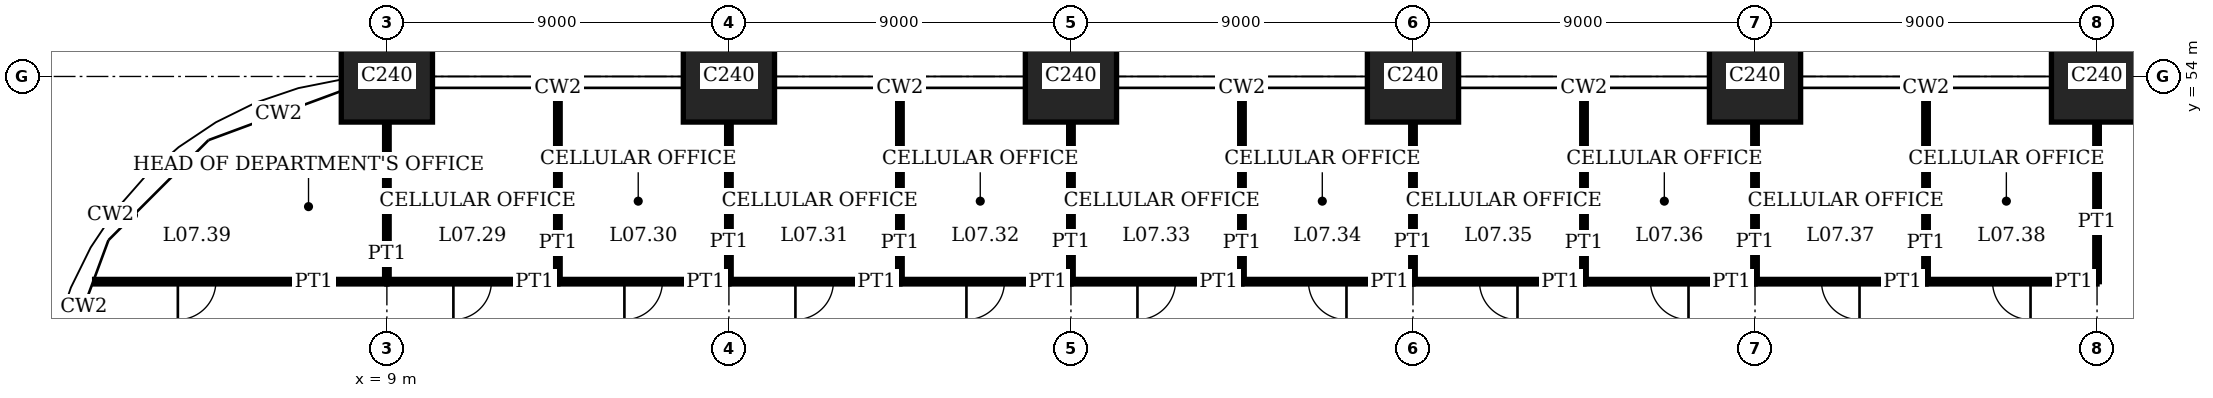
"""IFC4 building model, lengths in metres.
Left out: names, types, materials, properties, quantities, classifications, styles, units other than length and angle.
Written with IfcOpenShell. Run it as: python <this file> out.ifc"""

import sys

from ifc_helpers import new_model, si_unit, direction, frame, frame_2d, origin, origin_2d, place, context, subcontext, project, spatial, rectangle, extrude, element, fill, save


model = new_model("IFC4")
c1 = context("Model", 3, precision=1e-05, world=origin(), true_north=direction((0.0, 1.0)))
c2 = subcontext(c1, "Body", "Model", "MODEL_VIEW")
j1 = project(units=[si_unit("LENGTHUNIT", "METRE"), si_unit("PLANEANGLEUNIT", "RADIAN")], contexts=[c1])
p1 = place(None, origin())
s1 = spatial("IfcSite", under=j1, at=p1, CompositionType="ELEMENT")
p2 = place(p1, origin())
s2 = spatial("IfcBuilding", under=s1, at=p2, CompositionType="ELEMENT")
p3 = place(p2, frame((0.0, 0.0, 31.8)))
s3 = spatial("IfcBuildingStorey", under=s2, at=p3, CompositionType="ELEMENT", Elevation=31.8)
for number, where, z_axis, x_axis in (
    (1, (9.0, 54.0, 0.0), (0.0, 0.0, 1.0), (1.0, 0.0, 0.0)),
    (2, (18.0, 54.0, 0.0), (0.0, 0.0, 1.0), (1.0, 0.0, 0.0)),
    (3, (27.0, 54.0, 0.0), (0.0, 0.0, 1.0), (1.0, 0.0, 0.0)),
    (4, (36.0, 54.0, 0.0), (0.0, 0.0, 1.0), (1.0, 0.0, 0.0)),
    (5, (45.0, 54.0, 0.0), (0.0, 0.0, 1.0), (1.0, 0.0, 0.0)),
    (6, (54.0, 54.0, 0.0), (0.0, 0.0, 1.0), (1.0, 0.0, 0.0)),
):
    element("IfcColumn", number, at=place(p3, frame(where, z_axis=z_axis, x_axis=x_axis)), inside=s3, PredefinedType="COLUMN", context=c2, shape_type="SweptSolid", body=[
        extrude(rectangle(XDim=2.4, YDim=2.4, at=origin_2d()), origin(), (0.0, 0.0, 1.0), 4.0),
    ])
p4 = place(p3, frame((9.0, 48.6, 0.0), z_axis=(0.0, 0.0, 1.0), x_axis=(1.0, 0.0, 0.0)))
e7 = element("IfcWall", 7, at=p4, inside=s3, PredefinedType="PARTITIONING", context=c2, shape_type="SweptSolid", body=[
    extrude(rectangle(XDim=4.5, YDim=0.12, at=frame_2d((2.25, 0.0))), origin(), (0.0, 0.0, 1.0), 3.75),
])
p5 = place(p4, frame((1.75, 0.0, 0.0)))
e8 = element("IfcOpeningElement", 8, at=p5, cuts=e7, PredefinedType="OPENING", context=c2, shape_type="SweptSolid", body=[
    extrude(rectangle(XDim=1.0, YDim=2.4, at=frame_2d((0.5, 1.2))), frame((0.0, 0.07, 0.0), z_axis=(0.0, -1.0, 0.0), x_axis=(1.0, 0.0, 0.0)), (0.0, 0.0, 1.0), 0.14),
])
p6 = place(p3, frame((13.5, 48.6, 0.0), z_axis=(0.0, 0.0, 1.0), x_axis=(1.0, 0.0, 0.0)))
e9 = element("IfcWall", 9, at=p6, inside=s3, PredefinedType="PARTITIONING", context=c2, shape_type="SweptSolid", body=[
    extrude(rectangle(XDim=4.5, YDim=0.12, at=frame_2d((2.25, 0.0))), origin(), (0.0, 0.0, 1.0), 3.75),
])
p7 = place(p6, frame((1.75, 0.0, 0.0)))
e10 = element("IfcOpeningElement", 10, at=p7, cuts=e9, PredefinedType="OPENING", context=c2, shape_type="SweptSolid", body=[
    extrude(rectangle(XDim=1.0, YDim=2.4, at=frame_2d((0.5, 1.2))), frame((0.0, 0.07, 0.0), z_axis=(0.0, -1.0, 0.0), x_axis=(1.0, 0.0, 0.0)), (0.0, 0.0, 1.0), 0.14),
])
p8 = place(p3, frame((18.0, 48.6, 0.0), z_axis=(0.0, 0.0, 1.0), x_axis=(1.0, 0.0, 0.0)))
e11 = element("IfcWall", 11, at=p8, inside=s3, PredefinedType="PARTITIONING", context=c2, shape_type="SweptSolid", body=[
    extrude(rectangle(XDim=4.5, YDim=0.12, at=frame_2d((2.25, 0.0))), origin(), (0.0, 0.0, 1.0), 3.75),
])
p9 = place(p8, frame((1.75, 0.0, 0.0)))
e12 = element("IfcOpeningElement", 12, at=p9, cuts=e11, PredefinedType="OPENING", context=c2, shape_type="SweptSolid", body=[
    extrude(rectangle(XDim=1.0, YDim=2.4, at=frame_2d((0.5, 1.2))), frame((0.0, 0.07, 0.0), z_axis=(0.0, -1.0, 0.0), x_axis=(1.0, 0.0, 0.0)), (0.0, 0.0, 1.0), 0.14),
])
p10 = place(p3, frame((22.5, 48.6, 0.0), z_axis=(0.0, 0.0, 1.0), x_axis=(1.0, 0.0, 0.0)))
e13 = element("IfcWall", 13, at=p10, inside=s3, PredefinedType="PARTITIONING", context=c2, shape_type="SweptSolid", body=[
    extrude(rectangle(XDim=4.5, YDim=0.12, at=frame_2d((2.25, 0.0))), origin(), (0.0, 0.0, 1.0), 3.75),
])
p11 = place(p10, frame((1.75, 0.0, 0.0)))
e14 = element("IfcOpeningElement", 14, at=p11, cuts=e13, PredefinedType="OPENING", context=c2, shape_type="SweptSolid", body=[
    extrude(rectangle(XDim=1.0, YDim=2.4, at=frame_2d((0.5, 1.2))), frame((0.0, 0.07, 0.0), z_axis=(0.0, -1.0, 0.0), x_axis=(1.0, 0.0, 0.0)), (0.0, 0.0, 1.0), 0.14),
])
p12 = place(p3, frame((27.0, 48.6, 0.0), z_axis=(0.0, 0.0, 1.0), x_axis=(1.0, 0.0, 0.0)))
e15 = element("IfcWall", 15, at=p12, inside=s3, PredefinedType="PARTITIONING", context=c2, shape_type="SweptSolid", body=[
    extrude(rectangle(XDim=4.5, YDim=0.12, at=frame_2d((2.25, 0.0))), origin(), (0.0, 0.0, 1.0), 3.75),
])
p13 = place(p12, frame((1.75, 0.0, 0.0)))
e16 = element("IfcOpeningElement", 16, at=p13, cuts=e15, PredefinedType="OPENING", context=c2, shape_type="SweptSolid", body=[
    extrude(rectangle(XDim=1.0, YDim=2.4, at=frame_2d((0.5, 1.2))), frame((0.0, 0.07, 0.0), z_axis=(0.0, -1.0, 0.0), x_axis=(1.0, 0.0, 0.0)), (0.0, 0.0, 1.0), 0.14),
])
p14 = place(p3, frame((31.5, 48.6, 0.0), z_axis=(0.0, 0.0, 1.0), x_axis=(1.0, 0.0, 0.0)))
e17 = element("IfcWall", 17, at=p14, inside=s3, PredefinedType="PARTITIONING", context=c2, shape_type="SweptSolid", body=[
    extrude(rectangle(XDim=4.5, YDim=0.12, at=frame_2d((2.25, 0.0))), origin(), (0.0, 0.0, 1.0), 3.75),
])
p15 = place(p14, frame((1.75, 0.0, 0.0)))
e18 = element("IfcOpeningElement", 18, at=p15, cuts=e17, PredefinedType="OPENING", context=c2, shape_type="SweptSolid", body=[
    extrude(rectangle(XDim=1.0, YDim=2.4, at=frame_2d((0.5, 1.2))), frame((0.0, 0.07, 0.0), z_axis=(0.0, -1.0, 0.0), x_axis=(1.0, 0.0, 0.0)), (0.0, 0.0, 1.0), 0.14),
])
p16 = place(p3, frame((36.0, 48.6, 0.0), z_axis=(0.0, 0.0, 1.0), x_axis=(1.0, 0.0, 0.0)))
e19 = element("IfcWall", 19, at=p16, inside=s3, PredefinedType="PARTITIONING", context=c2, shape_type="SweptSolid", body=[
    extrude(rectangle(XDim=4.5, YDim=0.12, at=frame_2d((2.25, 0.0))), origin(), (0.0, 0.0, 1.0), 3.75),
])
p17 = place(p16, frame((1.75, 0.0, 0.0)))
e20 = element("IfcOpeningElement", 20, at=p17, cuts=e19, PredefinedType="OPENING", context=c2, shape_type="SweptSolid", body=[
    extrude(rectangle(XDim=1.0, YDim=2.4, at=frame_2d((0.5, 1.2))), frame((0.0, 0.07, 0.0), z_axis=(0.0, -1.0, 0.0), x_axis=(1.0, 0.0, 0.0)), (0.0, 0.0, 1.0), 0.14),
])
p18 = place(p3, frame((40.5, 48.6, 0.0), z_axis=(0.0, 0.0, 1.0), x_axis=(1.0, 0.0, 0.0)))
e21 = element("IfcWall", 21, at=p18, inside=s3, PredefinedType="PARTITIONING", context=c2, shape_type="SweptSolid", body=[
    extrude(rectangle(XDim=4.5, YDim=0.12, at=frame_2d((2.25, 0.0))), origin(), (0.0, 0.0, 1.0), 3.75),
])
p19 = place(p18, frame((1.75, 0.0, 0.0)))
e22 = element("IfcOpeningElement", 22, at=p19, cuts=e21, PredefinedType="OPENING", context=c2, shape_type="SweptSolid", body=[
    extrude(rectangle(XDim=1.0, YDim=2.4, at=frame_2d((0.5, 1.2))), frame((0.0, 0.07, 0.0), z_axis=(0.0, -1.0, 0.0), x_axis=(1.0, 0.0, 0.0)), (0.0, 0.0, 1.0), 0.14),
])
p20 = place(p3, frame((45.0, 48.6, 0.0), z_axis=(0.0, 0.0, 1.0), x_axis=(1.0, 0.0, 0.0)))
e23 = element("IfcWall", 23, at=p20, inside=s3, PredefinedType="PARTITIONING", context=c2, shape_type="SweptSolid", body=[
    extrude(rectangle(XDim=4.5, YDim=0.12, at=frame_2d((2.25, 0.0))), origin(), (0.0, 0.0, 1.0), 3.75),
])
p21 = place(p20, frame((1.75, 0.0, 0.0)))
e24 = element("IfcOpeningElement", 24, at=p21, cuts=e23, PredefinedType="OPENING", context=c2, shape_type="SweptSolid", body=[
    extrude(rectangle(XDim=1.0, YDim=2.4, at=frame_2d((0.5, 1.2))), frame((0.0, 0.07, 0.0), z_axis=(0.0, -1.0, 0.0), x_axis=(1.0, 0.0, 0.0)), (0.0, 0.0, 1.0), 0.14),
])
p22 = place(p3, frame((49.5, 48.6, 0.0), z_axis=(0.0, 0.0, 1.0), x_axis=(1.0, 0.0, 0.0)))
e25 = element("IfcWall", 25, at=p22, inside=s3, PredefinedType="PARTITIONING", context=c2, shape_type="SweptSolid", body=[
    extrude(rectangle(XDim=4.5, YDim=0.12, at=frame_2d((2.25, 0.0))), origin(), (0.0, 0.0, 1.0), 3.75),
])
p23 = place(p22, frame((1.75, 0.0, 0.0)))
e26 = element("IfcOpeningElement", 26, at=p23, cuts=e25, PredefinedType="OPENING", context=c2, shape_type="SweptSolid", body=[
    extrude(rectangle(XDim=1.0, YDim=2.4, at=frame_2d((0.5, 1.2))), frame((0.0, 0.07, 0.0), z_axis=(0.0, -1.0, 0.0), x_axis=(1.0, 0.0, 0.0)), (0.0, 0.0, 1.0), 0.14),
])
p24 = place(p3, frame((1.31, 48.6, 0.0), z_axis=(0.0, 0.0, 1.0), x_axis=(1.0, 0.0, 0.0)))
e27 = element("IfcWall", 27, at=p24, inside=s3, PredefinedType="PARTITIONING", context=c2, shape_type="SweptSolid", body=[
    extrude(rectangle(XDim=7.69, YDim=0.12, at=frame_2d((3.845, 0.0))), origin(), (0.0, 0.0, 1.0), 3.75),
])
p25 = place(p24, frame((2.19, 0.0, 0.0)))
e28 = element("IfcOpeningElement", 28, at=p25, cuts=e27, PredefinedType="OPENING", context=c2, shape_type="SweptSolid", body=[
    extrude(rectangle(XDim=1.0, YDim=2.4, at=frame_2d((0.5, 1.2))), frame((0.0, 0.07, 0.0), z_axis=(0.0, -1.0, 0.0), x_axis=(1.0, 0.0, 0.0)), (0.0, 0.0, 1.0), 0.14),
])
p26 = place(p3, frame((9.0, 48.6, 0.0), z_axis=(0.0, 0.0, 1.0), x_axis=(0.0, 1.0, 0.0)))
e29 = element("IfcWall", 29, at=p26, inside=s3, PredefinedType="PARTITIONING", context=c2, shape_type="SweptSolid", body=[
    extrude(rectangle(XDim=4.2, YDim=0.12, at=frame_2d((2.1, 0.0))), origin(), (0.0, 0.0, 1.0), 3.05),
])
p27 = place(p3, frame((13.5, 48.6, 0.0), z_axis=(0.0, 0.0, 1.0), x_axis=(0.0, 1.0, 0.0)))
e30 = element("IfcWall", 30, at=p27, inside=s3, PredefinedType="PARTITIONING", context=c2, shape_type="SweptSolid", body=[
    extrude(rectangle(XDim=5.09, YDim=0.12, at=frame_2d((2.545, 0.0))), origin(), (0.0, 0.0, 1.0), 3.75),
])
p28 = place(p3, frame((18.0, 48.6, 0.0), z_axis=(0.0, 0.0, 1.0), x_axis=(0.0, 1.0, 0.0)))
e31 = element("IfcWall", 31, at=p28, inside=s3, PredefinedType="PARTITIONING", context=c2, shape_type="SweptSolid", body=[
    extrude(rectangle(XDim=4.2, YDim=0.12, at=frame_2d((2.1, 0.0))), origin(), (0.0, 0.0, 1.0), 3.05),
])
p29 = place(p3, frame((22.5, 48.6, 0.0), z_axis=(0.0, 0.0, 1.0), x_axis=(0.0, 1.0, 0.0)))
e32 = element("IfcWall", 32, at=p29, inside=s3, PredefinedType="PARTITIONING", context=c2, shape_type="SweptSolid", body=[
    extrude(rectangle(XDim=5.09, YDim=0.12, at=frame_2d((2.545, 0.0))), origin(), (0.0, 0.0, 1.0), 3.75),
])
p30 = place(p3, frame((27.0, 48.6, 0.0), z_axis=(0.0, 0.0, 1.0), x_axis=(0.0, 1.0, 0.0)))
e33 = element("IfcWall", 33, at=p30, inside=s3, PredefinedType="PARTITIONING", context=c2, shape_type="SweptSolid", body=[
    extrude(rectangle(XDim=4.2, YDim=0.12, at=frame_2d((2.1, 0.0))), origin(), (0.0, 0.0, 1.0), 3.05),
])
p31 = place(p3, frame((31.5, 48.6, 0.0), z_axis=(0.0, 0.0, 1.0), x_axis=(0.0, 1.0, 0.0)))
e34 = element("IfcWall", 34, at=p31, inside=s3, PredefinedType="PARTITIONING", context=c2, shape_type="SweptSolid", body=[
    extrude(rectangle(XDim=5.09, YDim=0.12, at=frame_2d((2.545, 0.0))), origin(), (0.0, 0.0, 1.0), 3.75),
])
p32 = place(p3, frame((36.0, 48.6, 0.0), z_axis=(0.0, 0.0, 1.0), x_axis=(0.0, 1.0, 0.0)))
e35 = element("IfcWall", 35, at=p32, inside=s3, PredefinedType="PARTITIONING", context=c2, shape_type="SweptSolid", body=[
    extrude(rectangle(XDim=4.2, YDim=0.12, at=frame_2d((2.1, 0.0))), origin(), (0.0, 0.0, 1.0), 3.05),
])
p33 = place(p3, frame((40.5, 48.6, 0.0), z_axis=(0.0, 0.0, 1.0), x_axis=(0.0, 1.0, 0.0)))
e36 = element("IfcWall", 36, at=p33, inside=s3, PredefinedType="PARTITIONING", context=c2, shape_type="SweptSolid", body=[
    extrude(rectangle(XDim=5.09, YDim=0.12, at=frame_2d((2.545, 0.0))), origin(), (0.0, 0.0, 1.0), 3.75),
])
p34 = place(p3, frame((45.0, 48.6, 0.0), z_axis=(0.0, 0.0, 1.0), x_axis=(0.0, 1.0, 0.0)))
e37 = element("IfcWall", 37, at=p34, inside=s3, PredefinedType="PARTITIONING", context=c2, shape_type="SweptSolid", body=[
    extrude(rectangle(XDim=4.2, YDim=0.12, at=frame_2d((2.1, 0.0))), origin(), (0.0, 0.0, 1.0), 3.05),
])
p35 = place(p3, frame((49.5, 48.6, 0.0), z_axis=(0.0, 0.0, 1.0), x_axis=(0.0, 1.0, 0.0)))
e38 = element("IfcWall", 38, at=p35, inside=s3, PredefinedType="PARTITIONING", context=c2, shape_type="SweptSolid", body=[
    extrude(rectangle(XDim=5.09, YDim=0.12, at=frame_2d((2.545, 0.0))), origin(), (0.0, 0.0, 1.0), 3.75),
])
p36 = place(p3, frame((54.0, 48.6, 0.0), z_axis=(0.0, 0.0, 1.0), x_axis=(0.0, 1.0, 0.0)))
e39 = element("IfcWall", 39, at=p36, inside=s3, PredefinedType="PARTITIONING", context=c2, shape_type="SweptSolid", body=[
    extrude(rectangle(XDim=4.2, YDim=0.12, at=frame_2d((2.1, 0.0))), origin(), (0.0, 0.0, 1.0), 3.05),
])
p37 = place(p5, origin())
e40 = element("IfcDoor", 40, at=p37, inside=s3, OperationType="SINGLE_SWING_LEFT", PredefinedType="DOOR", context=c2, shape_type="SweptSolid", body=[
    extrude(rectangle(XDim=1.0, YDim=2.4, at=frame_2d((0.5, 1.2))), frame((0.0, 0.025, 0.0), z_axis=(0.0, -1.0, 0.0), x_axis=(1.0, 0.0, 0.0)), (0.0, 0.0, 1.0), 0.05),
])
fill(e8, e40)
p38 = place(p7, origin())
e41 = element("IfcDoor", 41, at=p38, inside=s3, OperationType="SINGLE_SWING_LEFT", PredefinedType="DOOR", context=c2, shape_type="SweptSolid", body=[
    extrude(rectangle(XDim=1.0, YDim=2.4, at=frame_2d((0.5, 1.2))), frame((0.0, 0.025, 0.0), z_axis=(0.0, -1.0, 0.0), x_axis=(1.0, 0.0, 0.0)), (0.0, 0.0, 1.0), 0.05),
])
fill(e10, e41)
p39 = place(p9, origin())
e42 = element("IfcDoor", 42, at=p39, inside=s3, OperationType="SINGLE_SWING_LEFT", PredefinedType="DOOR", context=c2, shape_type="SweptSolid", body=[
    extrude(rectangle(XDim=1.0, YDim=2.4, at=frame_2d((0.5, 1.2))), frame((0.0, 0.025, 0.0), z_axis=(0.0, -1.0, 0.0), x_axis=(1.0, 0.0, 0.0)), (0.0, 0.0, 1.0), 0.05),
])
fill(e12, e42)
p40 = place(p11, origin())
e43 = element("IfcDoor", 43, at=p40, inside=s3, OperationType="SINGLE_SWING_LEFT", PredefinedType="DOOR", context=c2, shape_type="SweptSolid", body=[
    extrude(rectangle(XDim=1.0, YDim=2.4, at=frame_2d((0.5, 1.2))), frame((0.0, 0.025, 0.0), z_axis=(0.0, -1.0, 0.0), x_axis=(1.0, 0.0, 0.0)), (0.0, 0.0, 1.0), 0.05),
])
fill(e14, e43)
p41 = place(p13, origin())
e44 = element("IfcDoor", 44, at=p41, inside=s3, OperationType="SINGLE_SWING_LEFT", PredefinedType="DOOR", context=c2, shape_type="SweptSolid", body=[
    extrude(rectangle(XDim=1.0, YDim=2.4, at=frame_2d((0.5, 1.2))), frame((0.0, 0.025, 0.0), z_axis=(0.0, -1.0, 0.0), x_axis=(1.0, 0.0, 0.0)), (0.0, 0.0, 1.0), 0.05),
])
fill(e16, e44)
p42 = place(p15, origin())
e45 = element("IfcDoor", 45, at=p42, inside=s3, OperationType="SINGLE_SWING_RIGHT", PredefinedType="DOOR", context=c2, shape_type="SweptSolid", body=[
    extrude(rectangle(XDim=1.0, YDim=2.4, at=frame_2d((0.5, 1.2))), frame((0.0, 0.025, 0.0), z_axis=(0.0, -1.0, 0.0), x_axis=(1.0, 0.0, 0.0)), (0.0, 0.0, 1.0), 0.05),
])
fill(e18, e45)
p43 = place(p17, origin())
e46 = element("IfcDoor", 46, at=p43, inside=s3, OperationType="SINGLE_SWING_RIGHT", PredefinedType="DOOR", context=c2, shape_type="SweptSolid", body=[
    extrude(rectangle(XDim=1.0, YDim=2.4, at=frame_2d((0.5, 1.2))), frame((0.0, 0.025, 0.0), z_axis=(0.0, -1.0, 0.0), x_axis=(1.0, 0.0, 0.0)), (0.0, 0.0, 1.0), 0.05),
])
fill(e20, e46)
p44 = place(p19, origin())
e47 = element("IfcDoor", 47, at=p44, inside=s3, OperationType="SINGLE_SWING_RIGHT", PredefinedType="DOOR", context=c2, shape_type="SweptSolid", body=[
    extrude(rectangle(XDim=1.0, YDim=2.4, at=frame_2d((0.5, 1.2))), frame((0.0, 0.025, 0.0), z_axis=(0.0, -1.0, 0.0), x_axis=(1.0, 0.0, 0.0)), (0.0, 0.0, 1.0), 0.05),
])
fill(e22, e47)
p45 = place(p21, origin())
e48 = element("IfcDoor", 48, at=p45, inside=s3, OperationType="SINGLE_SWING_RIGHT", PredefinedType="DOOR", context=c2, shape_type="SweptSolid", body=[
    extrude(rectangle(XDim=1.0, YDim=2.4, at=frame_2d((0.5, 1.2))), frame((0.0, 0.025, 0.0), z_axis=(0.0, -1.0, 0.0), x_axis=(1.0, 0.0, 0.0)), (0.0, 0.0, 1.0), 0.05),
])
fill(e24, e48)
p46 = place(p23, origin())
e49 = element("IfcDoor", 49, at=p46, inside=s3, OperationType="SINGLE_SWING_RIGHT", PredefinedType="DOOR", context=c2, shape_type="SweptSolid", body=[
    extrude(rectangle(XDim=1.0, YDim=2.4, at=frame_2d((0.5, 1.2))), frame((0.0, 0.025, 0.0), z_axis=(0.0, -1.0, 0.0), x_axis=(1.0, 0.0, 0.0)), (0.0, 0.0, 1.0), 0.05),
])
fill(e26, e49)
p47 = place(p25, origin())
e50 = element("IfcDoor", 50, at=p47, inside=s3, OperationType="SINGLE_SWING_LEFT", PredefinedType="DOOR", context=c2, shape_type="SweptSolid", body=[
    extrude(rectangle(XDim=1.0, YDim=2.4, at=frame_2d((0.5, 1.2))), frame((0.0, 0.025, 0.0), z_axis=(0.0, -1.0, 0.0), x_axis=(1.0, 0.0, 0.0)), (0.0, 0.0, 1.0), 0.05),
])
fill(e28, e50)
save(model, sys.argv[1])
